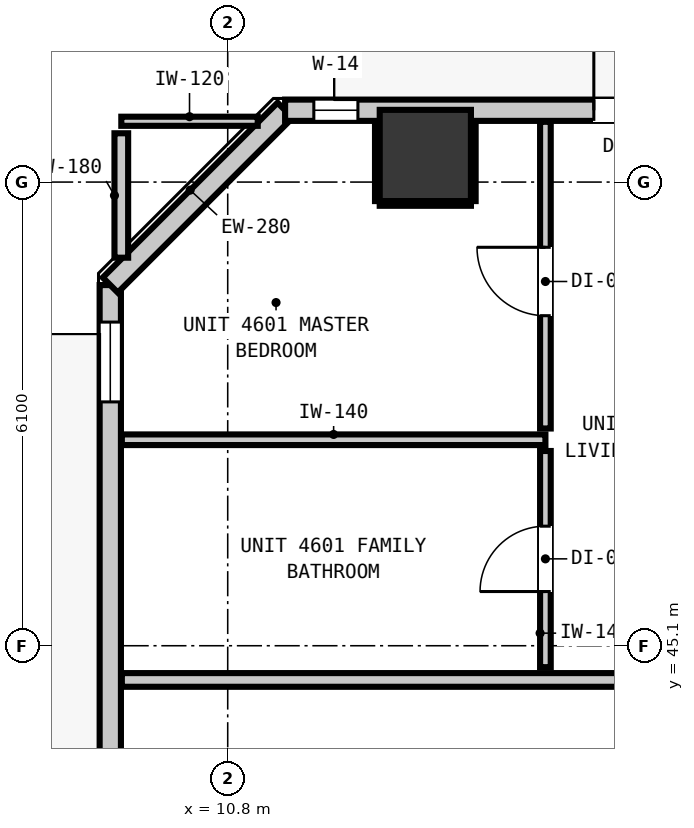
"""IFC4 building model, lengths in metres.
Left out: names, types, materials, properties, quantities, classifications, styles, units other than length and angle.
Written with IfcOpenShell. Run it as: python <this file> out.ifc"""

import sys

from ifc_helpers import new_model, si_unit, direction, frame, frame_2d, origin, origin_2d, place, context, subcontext, project, spatial, rectangle, extrude, element, fill, save


model = new_model("IFC4")
c1 = context("Model", 3, precision=1e-05, world=origin(), true_north=direction((0.0, 1.0)))
c2 = subcontext(c1, "Body", "Model", "MODEL_VIEW")
j1 = project(units=[si_unit("LENGTHUNIT", "METRE"), si_unit("PLANEANGLEUNIT", "RADIAN")], contexts=[c1])
p1 = place(None, origin())
s1 = spatial("IfcSite", under=j1, at=p1, CompositionType="ELEMENT")
p2 = place(p1, origin())
s2 = spatial("IfcBuilding", under=s1, at=p2, CompositionType="ELEMENT")
p3 = place(p2, frame((0.0, 0.0, 159.2)))
s3 = spatial("IfcBuildingStorey", under=s2, at=p3, CompositionType="ELEMENT", Elevation=159.2)
p4 = place(p3, frame((13.4, 51.55, 0.0), z_axis=(0.0, 0.0, 1.0), x_axis=(1.0, 0.0, 0.0)))
e1 = element("IfcColumn", 1, at=p4, inside=s3, PredefinedType="COLUMN", context=c2, shape_type="SweptSolid", body=[
    extrude(rectangle(XDim=1.2, YDim=1.2, at=origin_2d()), origin(), (0.0, 0.0, 1.0), 3.32),
])
p5 = place(p3, frame((9.255, 17.555, 0.0), z_axis=(0.0, 0.0, 1.0), x_axis=(0.0, 1.0, 0.0)))
e2 = element("IfcWall", 2, at=p5, inside=s3, PredefinedType="STANDARD", context=c2, shape_type="SweptSolid", body=[
    extrude(rectangle(XDim=32.29, YDim=0.28, at=frame_2d((16.145, 0.0))), origin(), (0.0, 0.0, 1.0), 3.08),
])
p6 = place(p5, frame((5.467, 0.0, 0.0)))
e3 = element("IfcOpeningElement", 3, at=p6, cuts=e2, PredefinedType="OPENING", context=c2, shape_type="SweptSolid", body=[
    extrude(rectangle(XDim=1.0, YDim=2.15, at=frame_2d((0.5, 1.075))), frame((0.0, 0.15, 0.0), z_axis=(0.0, -1.0, 0.0), x_axis=(1.0, 0.0, 0.0)), (0.0, 0.0, 1.0), 0.3),
])
p7 = place(p5, frame((0.417, 0.0, 0.85)))
e4 = element("IfcOpeningElement", 4, at=p7, cuts=e2, PredefinedType="OPENING", context=c2, shape_type="SweptSolid", body=[
    extrude(rectangle(XDim=1.05, YDim=1.65, at=frame_2d((0.525, 0.825))), frame((0.0, 0.15, 0.0), z_axis=(0.0, -1.0, 0.0), x_axis=(1.0, 0.0, 0.0)), (0.0, 0.0, 1.0), 0.3),
])
p8 = place(p5, frame((30.753, 0.0, 0.85)))
e5 = element("IfcOpeningElement", 5, at=p8, cuts=e2, PredefinedType="OPENING", context=c2, shape_type="SweptSolid", body=[
    extrude(rectangle(XDim=1.05, YDim=1.65, at=frame_2d((0.525, 0.825))), frame((0.0, 0.15, 0.0), z_axis=(0.0, -1.0, 0.0), x_axis=(1.0, 0.0, 0.0)), (0.0, 0.0, 1.0), 0.3),
])
p9 = place(p3, frame((9.255, 49.845, 0.0), z_axis=(0.0, 0.0, 1.0), x_axis=(0.707106781187, 0.707106781187, 0.0)))
e6 = element("IfcWall", 6, at=p9, inside=s3, PredefinedType="STANDARD", context=c2, shape_type="SweptSolid", body=[
    extrude(rectangle(XDim=3.253, YDim=0.28, at=frame_2d((1.626, 0.0))), origin(), (0.0, 0.0, 1.0), 3.08),
])
p10 = place(p3, frame((11.555, 52.145, 0.0), z_axis=(0.0, 0.0, 1.0), x_axis=(1.0, 0.0, 0.0)))
e7 = element("IfcWall", 7, at=p10, inside=s3, PredefinedType="STANDARD", context=c2, shape_type="SweptSolid", body=[
    extrude(rectangle(XDim=35.09, YDim=0.28, at=frame_2d((17.545, 0.0))), origin(), (0.0, 0.0, 1.0), 3.08),
])
p11 = place(p10, frame((4.062, 0.0, 0.0)))
e8 = element("IfcOpeningElement", 8, at=p11, cuts=e7, PredefinedType="OPENING", context=c2, shape_type="SweptSolid", body=[
    extrude(rectangle(XDim=1.0, YDim=2.15, at=frame_2d((0.5, 1.075))), frame((0.0, 0.15, 0.0), z_axis=(0.0, -1.0, 0.0), x_axis=(1.0, 0.0, 0.0)), (0.0, 0.0, 1.0), 0.3),
])
p12 = place(p10, frame((5.888, 0.0, 0.85)))
e9 = element("IfcOpeningElement", 9, at=p12, cuts=e7, PredefinedType="OPENING", context=c2, shape_type="SweptSolid", body=[
    extrude(rectangle(XDim=1.05, YDim=1.65, at=frame_2d((0.525, 0.825))), frame((0.0, 0.15, 0.0), z_axis=(0.0, -1.0, 0.0), x_axis=(1.0, 0.0, 0.0)), (0.0, 0.0, 1.0), 0.3),
])
p13 = place(p10, frame((0.378, 0.0, 0.85)))
e10 = element("IfcOpeningElement", 10, at=p13, cuts=e7, PredefinedType="OPENING", context=c2, shape_type="SweptSolid", body=[
    extrude(rectangle(XDim=0.58, YDim=1.5, at=frame_2d((0.29, 0.75))), frame((0.0, 0.15, 0.0), z_axis=(0.0, -1.0, 0.0), x_axis=(1.0, 0.0, 0.0)), (0.0, 0.0, 1.0), 0.3),
])
p14 = place(p10, frame((10.504, 0.0, 0.85)))
e11 = element("IfcOpeningElement", 11, at=p14, cuts=e7, PredefinedType="OPENING", context=c2, shape_type="SweptSolid", body=[
    extrude(rectangle(XDim=1.05, YDim=1.65, at=frame_2d((0.525, 0.825))), frame((0.0, 0.15, 0.0), z_axis=(0.0, -1.0, 0.0), x_axis=(1.0, 0.0, 0.0)), (0.0, 0.0, 1.0), 0.3),
])
p15 = place(p10, frame((12.639, 0.0, 0.85)))
e12 = element("IfcOpeningElement", 12, at=p15, cuts=e7, PredefinedType="OPENING", context=c2, shape_type="SweptSolid", body=[
    extrude(rectangle(XDim=3.0, YDim=2.1, at=frame_2d((1.5, 1.05))), frame((0.0, 0.15, 0.0), z_axis=(0.0, -1.0, 0.0), x_axis=(1.0, 0.0, 0.0)), (0.0, 0.0, 1.0), 0.3),
])
p16 = place(p10, frame((21.152, 0.0, 0.85)))
e13 = element("IfcOpeningElement", 13, at=p16, cuts=e7, PredefinedType="OPENING", context=c2, shape_type="SweptSolid", body=[
    extrude(rectangle(XDim=3.0, YDim=2.1, at=frame_2d((1.5, 1.05))), frame((0.0, 0.15, 0.0), z_axis=(0.0, -1.0, 0.0), x_axis=(1.0, 0.0, 0.0)), (0.0, 0.0, 1.0), 0.3),
])
p17 = place(p10, frame((18.977, 0.0, 0.85)))
e14 = element("IfcOpeningElement", 14, at=p17, cuts=e7, PredefinedType="OPENING", context=c2, shape_type="SweptSolid", body=[
    extrude(rectangle(XDim=1.05, YDim=1.65, at=frame_2d((0.525, 0.825))), frame((0.0, 0.15, 0.0), z_axis=(0.0, -1.0, 0.0), x_axis=(1.0, 0.0, 0.0)), (0.0, 0.0, 1.0), 0.3),
])
p18 = place(p10, frame((28.544, 0.0, 0.85)))
e15 = element("IfcOpeningElement", 15, at=p18, cuts=e7, PredefinedType="OPENING", context=c2, shape_type="SweptSolid", body=[
    extrude(rectangle(XDim=3.0, YDim=2.1, at=frame_2d((1.5, 1.05))), frame((0.0, 0.15, 0.0), z_axis=(0.0, -1.0, 0.0), x_axis=(1.0, 0.0, 0.0)), (0.0, 0.0, 1.0), 0.3),
])
p19 = place(p10, frame((33.447, 0.0, 0.85)))
e16 = element("IfcOpeningElement", 16, at=p19, cuts=e7, PredefinedType="OPENING", context=c2, shape_type="SweptSolid", body=[
    extrude(rectangle(XDim=1.05, YDim=1.65, at=frame_2d((0.525, 0.825))), frame((0.0, 0.15, 0.0), z_axis=(0.0, -1.0, 0.0), x_axis=(1.0, 0.0, 0.0)), (0.0, 0.0, 1.0), 0.3),
])
p20 = place(p3, frame((9.407, 44.65, 0.0), z_axis=(0.0, 0.0, 1.0), x_axis=(1.0, 0.0, 0.0)))
e17 = element("IfcWall", 17, at=p20, inside=s3, PredefinedType="PARTITIONING", context=c2, shape_type="SweptSolid", body=[
    extrude(rectangle(XDim=39.386, YDim=0.18, at=frame_2d((19.693, 0.0))), origin(), (0.0, 0.0, 1.0), 3.08),
])
p21 = place(p20, frame((7.193, 0.0, 0.0)))
e18 = element("IfcOpeningElement", 18, at=p21, cuts=e17, PredefinedType="OPENING", context=c2, shape_type="SweptSolid", body=[
    extrude(rectangle(XDim=1.0, YDim=2.15, at=frame_2d((0.5, 1.075))), frame((0.0, 0.1, 0.0), z_axis=(0.0, -1.0, 0.0), x_axis=(1.0, 0.0, 0.0)), (0.0, 0.0, 1.0), 0.2),
])
p22 = place(p20, frame((25.699, 0.0, 0.0)))
e19 = element("IfcOpeningElement", 19, at=p22, cuts=e17, PredefinedType="OPENING", context=c2, shape_type="SweptSolid", body=[
    extrude(rectangle(XDim=1.0, YDim=2.15, at=frame_2d((0.5, 1.075))), frame((0.0, 0.1, 0.0), z_axis=(0.0, -1.0, 0.0), x_axis=(1.0, 0.0, 0.0)), (0.0, 0.0, 1.0), 0.2),
])
p23 = place(p3, frame((9.407, 47.81, 0.0), z_axis=(0.0, 0.0, 1.0), x_axis=(1.0, 0.0, 0.0)))
e20 = element("IfcWall", 20, at=p23, inside=s3, PredefinedType="PARTITIONING", context=c2, shape_type="SweptSolid", body=[
    extrude(rectangle(XDim=5.573, YDim=0.14, at=frame_2d((2.787, 0.0))), origin(), (0.0, 0.0, 1.0), 3.08),
])
p24 = place(p3, frame((9.4, 52.0, 0.0), z_axis=(0.0, 0.0, 1.0), x_axis=(1.0, 0.0, 0.0)))
e21 = element("IfcWall", 21, at=p24, inside=s3, PredefinedType="PARTITIONING", context=c2, shape_type="SweptSolid", body=[
    extrude(rectangle(XDim=1.795, YDim=0.12, at=frame_2d((0.897, 0.0))), origin(), (0.0, 0.0, 1.0), 3.08),
])
p25 = place(p3, frame((9.4, 50.205, 0.0), z_axis=(0.0, 0.0, 1.0), x_axis=(0.0, 1.0, 0.0)))
e22 = element("IfcWall", 22, at=p25, inside=s3, PredefinedType="PARTITIONING", context=c2, shape_type="SweptSolid", body=[
    extrude(rectangle(XDim=1.637, YDim=0.18, at=frame_2d((0.818, 0.0))), origin(), (0.0, 0.0, 1.0), 3.08),
])
p26 = place(p3, frame((14.98, 44.818, 0.0), z_axis=(0.0, 0.0, 1.0), x_axis=(0.0, 1.0, 0.0)))
e23 = element("IfcWall", 23, at=p26, inside=s3, PredefinedType="PARTITIONING", context=c2, shape_type="SweptSolid", body=[
    extrude(rectangle(XDim=2.844, YDim=0.14, at=frame_2d((1.422, 0.0))), origin(), (0.0, 0.0, 1.0), 3.08),
])
p27 = place(p26, frame((0.995, 0.0, 0.0)))
e24 = element("IfcOpeningElement", 24, at=p27, cuts=e23, PredefinedType="OPENING", context=c2, shape_type="SweptSolid", body=[
    extrude(rectangle(XDim=0.86, YDim=2.02, at=frame_2d((0.43, 1.01))), frame((0.0, 0.08, 0.0), z_axis=(0.0, -1.0, 0.0), x_axis=(1.0, 0.0, 0.0)), (0.0, 0.0, 1.0), 0.16),
])
p28 = place(p3, frame((14.98, 47.958, 0.0), z_axis=(0.0, 0.0, 1.0), x_axis=(0.0, 1.0, 0.0)))
e25 = element("IfcWall", 25, at=p28, inside=s3, PredefinedType="PARTITIONING", context=c2, shape_type="SweptSolid", body=[
    extrude(rectangle(XDim=4.035, YDim=0.14, at=frame_2d((2.018, 0.0))), origin(), (0.0, 0.0, 1.0), 3.08),
])
p29 = place(p28, frame((1.484, 0.0, 0.0)))
e26 = element("IfcOpeningElement", 26, at=p29, cuts=e25, PredefinedType="OPENING", context=c2, shape_type="SweptSolid", body=[
    extrude(rectangle(XDim=0.9, YDim=2.1, at=frame_2d((0.45, 1.05))), frame((0.0, 0.08, 0.0), z_axis=(0.0, -1.0, 0.0), x_axis=(1.0, 0.0, 0.0)), (0.0, 0.0, 1.0), 0.16),
])
p30 = place(p3, frame((12.8, 50.918, 0.0), z_axis=(0.0, 0.0, 1.0), x_axis=(1.0, 0.0, 0.0)))
e27 = element("IfcWall", 27, at=p30, inside=s3, PredefinedType="PARTITIONING", context=c2, shape_type="SweptSolid", body=[
    extrude(rectangle(XDim=1.2, YDim=0.06, at=frame_2d((0.6, 0.0))), origin(), (0.0, 0.0, 1.0), 1.45),
])
for number, where, z_axis, x_axis in (
    (28, (12.768, 50.95, 0.0), (0.0, 0.0, 1.0), (0.0, 1.0, 0.0)),
    (29, (14.032, 50.95, 0.0), (0.0, 0.0, 1.0), (0.0, 1.0, 0.0)),
):
    element("IfcWall", number, at=place(p3, frame(where, z_axis=z_axis, x_axis=x_axis)), inside=s3, PredefinedType="PARTITIONING", context=c2, shape_type="SweptSolid", body=[
        extrude(rectangle(XDim=1.04, YDim=0.06, at=frame_2d((0.52, 0.0))), origin(), (0.0, 0.0, 1.0), 1.45),
    ])
p31 = place(p11, origin())
e30 = element("IfcDoor", 30, at=p31, inside=s3, OperationType="SINGLE_SWING_LEFT", PredefinedType="DOOR", context=c2, shape_type="SweptSolid", body=[
    extrude(rectangle(XDim=1.0, YDim=2.15, at=frame_2d((0.5, 1.075))), frame((0.0, 0.025, 0.0), z_axis=(0.0, -1.0, 0.0), x_axis=(1.0, 0.0, 0.0)), (0.0, 0.0, 1.0), 0.05),
])
fill(e8, e30)
p32 = place(p8, origin())
e31 = element("IfcWindow", 31, at=p32, inside=s3, PartitioningType="SINGLE_PANEL", PredefinedType="WINDOW", context=c2, shape_type="SweptSolid", body=[
    extrude(rectangle(XDim=1.05, YDim=1.65, at=frame_2d((0.525, 0.825))), frame((0.0, 0.03, 0.0), z_axis=(0.0, -1.0, 0.0), x_axis=(1.0, 0.0, 0.0)), (0.0, 0.0, 1.0), 0.06),
])
fill(e5, e31)
p33 = place(p13, origin())
e32 = element("IfcWindow", 32, at=p33, inside=s3, PartitioningType="SINGLE_PANEL", PredefinedType="WINDOW", context=c2, shape_type="SweptSolid", body=[
    extrude(rectangle(XDim=0.58, YDim=1.5, at=frame_2d((0.29, 0.75))), frame((0.0, 0.03, 0.0), z_axis=(0.0, -1.0, 0.0), x_axis=(1.0, 0.0, 0.0)), (0.0, 0.0, 1.0), 0.06),
])
fill(e10, e32)
p34 = place(p27, origin())
e33 = element("IfcDoor", 33, at=p34, inside=s3, OperationType="SINGLE_SWING_LEFT", PredefinedType="DOOR", context=c2, shape_type="SweptSolid", body=[
    extrude(rectangle(XDim=0.86, YDim=2.02, at=frame_2d((0.43, 1.01))), frame((0.0, 0.025, 0.0), z_axis=(0.0, -1.0, 0.0), x_axis=(1.0, 0.0, 0.0)), (0.0, 0.0, 1.0), 0.05),
])
fill(e24, e33)
p35 = place(p29, origin())
e34 = element("IfcDoor", 34, at=p35, inside=s3, OperationType="SINGLE_SWING_RIGHT", PredefinedType="DOOR", context=c2, shape_type="SweptSolid", body=[
    extrude(rectangle(XDim=0.9, YDim=2.1, at=frame_2d((0.45, 1.05))), frame((0.0, 0.025, 0.0), z_axis=(0.0, -1.0, 0.0), x_axis=(1.0, 0.0, 0.0)), (0.0, 0.0, 1.0), 0.05),
])
fill(e26, e34)
save(model, sys.argv[1])
